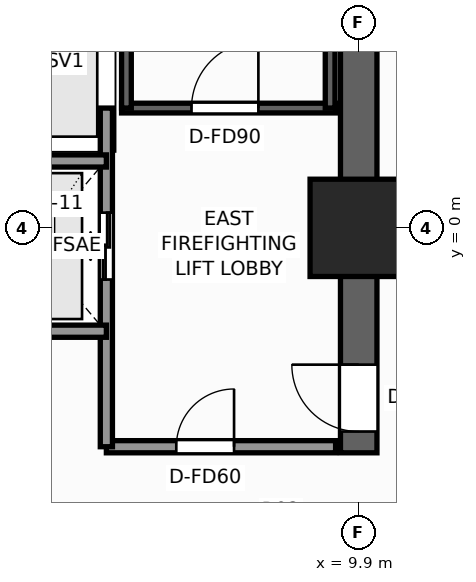
"""IFC4 building model, lengths in metres.
Left out: names, types, materials, properties, quantities, classifications, styles, units other than length and angle.
Written with IfcOpenShell. Run it as: python <this file> out.ifc"""

import sys

from ifc_helpers import new_model, si_unit, direction, frame, frame_2d, origin, origin_2d, place, context, subcontext, project, spatial, rectangle, extrude, element, fill, save


model = new_model("IFC4")
c1 = context("Model", 3, precision=1e-05, world=origin(), true_north=direction((0.0, 1.0)))
c2 = subcontext(c1, "Body", "Model", "MODEL_VIEW")
j1 = project(units=[si_unit("LENGTHUNIT", "METRE"), si_unit("PLANEANGLEUNIT", "RADIAN")], contexts=[c1])
p1 = place(None, origin())
s1 = spatial("IfcSite", under=j1, at=p1, CompositionType="ELEMENT")
p2 = place(p1, origin())
s2 = spatial("IfcBuilding", under=s1, at=p2, CompositionType="ELEMENT")
p3 = place(p2, frame((0.0, 0.0, 10.0)))
s3 = spatial("IfcBuildingStorey", under=s2, at=p3, CompositionType="ELEMENT", Elevation=10.0)
p4 = place(p3, frame((9.9, -3.7, 0.0), z_axis=(0.0, 0.0, 1.0), x_axis=(0.0, 1.0, 0.0)))
e1 = element("IfcWall", 1, at=p4, inside=s3, PredefinedType="SHEAR", context=c2, shape_type="SweptSolid", body=[
    extrude(rectangle(XDim=13.3, YDim=0.6, at=frame_2d((6.65, 0.0))), origin(), (0.0, 0.0, 1.0), 5.2),
])
p5 = place(p4, frame((0.35, 0.0, 0.0)))
e2 = element("IfcOpeningElement", 2, at=p5, cuts=e1, PredefinedType="OPENING", context=c2, shape_type="SweptSolid", body=[
    extrude(rectangle(XDim=1.1, YDim=2.2, at=frame_2d((0.55, 1.1))), frame((0.0, 0.31, 0.0), z_axis=(0.0, -1.0, 0.0), x_axis=(1.0, 0.0, 0.0)), (0.0, 0.0, 1.0), 0.62),
])
p6 = place(p3, frame((9.9, 0.0, 0.0), z_axis=(0.0, 0.0, 1.0), x_axis=(1.0, 0.0, 0.0)))
e3 = element("IfcColumn", 3, at=p6, inside=s3, PredefinedType="COLUMN", context=c2, shape_type="SweptSolid", body=[
    extrude(rectangle(XDim=1.6, YDim=1.6, at=origin_2d()), origin(), (0.0, 0.0, 1.0), 5.2),
])
p7 = place(p3, frame((6.0, 1.97, 0.0), z_axis=(0.0, 0.0, 1.0), x_axis=(1.0, 0.0, 0.0)))
e4 = element("IfcWall", 4, at=p7, inside=s3, PredefinedType="SHEAR", context=c2, shape_type="SweptSolid", body=[
    extrude(rectangle(XDim=3.52, YDim=0.16, at=frame_2d((1.76, 0.0))), origin(), (0.0, 0.0, 1.0), 5.2),
])
p8 = place(p7, frame((1.15, 0.0, 0.0)))
e5 = element("IfcOpeningElement", 5, at=p8, cuts=e4, PredefinedType="OPENING", context=c2, shape_type="SweptSolid", body=[
    extrude(rectangle(XDim=1.1, YDim=2.2, at=frame_2d((0.55, 1.1))), frame((0.0, 0.09, 0.0), z_axis=(0.0, -1.0, 0.0), x_axis=(1.0, 0.0, 0.0)), (0.0, 0.0, 1.0), 0.18),
])
for number, where, z_axis, x_axis in (
    (6, (6.08, 1.97, 0.0), (0.0, 0.0, 1.0), (0.0, 1.0, 0.0)),
    (7, (9.43, 1.97, 0.0), (0.0, 0.0, 1.0), (0.0, 1.0, 0.0)),
):
    element("IfcWall", number, at=place(p3, frame(where, z_axis=z_axis, x_axis=x_axis)), inside=s3, PredefinedType="SHEAR", context=c2, shape_type="SweptSolid", body=[
        extrude(rectangle(XDim=7.56, YDim=0.16, at=frame_2d((3.78, 0.0))), origin(), (0.0, 0.0, 1.0), 5.2),
    ])
p9 = place(p3, frame((5.75, -3.6, 0.0), z_axis=(0.0, 0.0, 1.0), x_axis=(1.0, 0.0, 0.0)))
e8 = element("IfcWall", 8, at=p9, inside=s3, PredefinedType="SOLIDWALL", context=c2, shape_type="SweptSolid", body=[
    extrude(rectangle(XDim=3.77, YDim=0.2, at=frame_2d((1.885, 0.0))), origin(), (0.0, 0.0, 1.0), 4.92),
])
p10 = place(p9, frame((1.15, 0.0, 0.0)))
e9 = element("IfcOpeningElement", 9, at=p10, cuts=e8, PredefinedType="OPENING", context=c2, shape_type="SweptSolid", body=[
    extrude(rectangle(XDim=0.95, YDim=2.06, at=frame_2d((0.475, 1.03))), frame((0.0, 0.11, 0.0), z_axis=(0.0, -1.0, 0.0), x_axis=(1.0, 0.0, 0.0)), (0.0, 0.0, 1.0), 0.22),
])
p11 = place(p3, frame((5.75, -3.6, 0.0), z_axis=(0.0, 0.0, 1.0), x_axis=(0.0, 1.0, 0.0)))
e10 = element("IfcWall", 10, at=p11, inside=s3, PredefinedType="SOLIDWALL", context=c2, shape_type="SweptSolid", body=[
    extrude(rectangle(XDim=5.57, YDim=0.2, at=frame_2d((2.785, 0.0))), origin(), (0.0, 0.0, 1.0), 4.92),
])
p12 = place(p11, frame((2.75, 0.0, 0.0)))
e11 = element("IfcOpeningElement", 11, at=p12, cuts=e10, PredefinedType="OPENING", context=c2, shape_type="SweptSolid", body=[
    extrude(rectangle(XDim=1.1, YDim=2.2, at=frame_2d((0.55, 1.1))), frame((0.0, 0.11, 0.0), z_axis=(0.0, -1.0, 0.0), x_axis=(1.0, 0.0, 0.0)), (0.0, 0.0, 1.0), 0.22),
])
for number, where, z_axis, x_axis in (
    (12, (3.35, -1.7, 0.0), (0.0, 0.0, 1.0), (1.0, 0.0, 0.0)),
    (13, (3.35, 1.1, 0.0), (0.0, 0.0, 1.0), (1.0, 0.0, 0.0)),
):
    element("IfcWall", number, at=place(p3, frame(where, z_axis=z_axis, x_axis=x_axis)), inside=s3, PredefinedType="SOLIDWALL", context=c2, shape_type="SweptSolid", body=[
        extrude(rectangle(XDim=2.4, YDim=0.2, at=frame_2d((1.2, 0.0))), origin(), (0.0, 0.0, 1.0), 4.92),
    ])
p13 = place(p8, origin())
e14 = element("IfcDoor", 14, at=p13, inside=s3, OperationType="SINGLE_SWING_RIGHT", PredefinedType="DOOR", context=c2, shape_type="SweptSolid", body=[
    extrude(rectangle(XDim=1.1, YDim=2.2, at=frame_2d((0.55, 1.1))), frame((0.0, 0.025, 0.0), z_axis=(0.0, -1.0, 0.0), x_axis=(1.0, 0.0, 0.0)), (0.0, 0.0, 1.0), 0.05),
])
fill(e5, e14)
p14 = place(p5, origin())
e15 = element("IfcDoor", 15, at=p14, inside=s3, OperationType="SINGLE_SWING_RIGHT", PredefinedType="DOOR", context=c2, shape_type="SweptSolid", body=[
    extrude(rectangle(XDim=1.1, YDim=2.2, at=frame_2d((0.55, 1.1))), frame((0.0, 0.025, 0.0), z_axis=(0.0, -1.0, 0.0), x_axis=(1.0, 0.0, 0.0)), (0.0, 0.0, 1.0), 0.05),
])
fill(e2, e15)
p15 = place(p12, origin())
e16 = element("IfcDoor", 16, at=p15, inside=s3, OperationType="DOUBLE_DOOR_SLIDING", PredefinedType="DOOR", context=c2, shape_type="SweptSolid", body=[
    extrude(rectangle(XDim=1.1, YDim=2.2, at=frame_2d((0.55, 1.1))), frame((0.0, 0.025, 0.0), z_axis=(0.0, -1.0, 0.0), x_axis=(1.0, 0.0, 0.0)), (0.0, 0.0, 1.0), 0.05),
])
fill(e11, e16)
p16 = place(p10, origin())
e17 = element("IfcDoor", 17, at=p16, inside=s3, OperationType="SINGLE_SWING_RIGHT", PredefinedType="DOOR", context=c2, shape_type="SweptSolid", body=[
    extrude(rectangle(XDim=0.95, YDim=2.06, at=frame_2d((0.475, 1.03))), frame((0.0, 0.025, 0.0), z_axis=(0.0, -1.0, 0.0), x_axis=(1.0, 0.0, 0.0)), (0.0, 0.0, 1.0), 0.05),
])
fill(e9, e17)
save(model, sys.argv[1])
